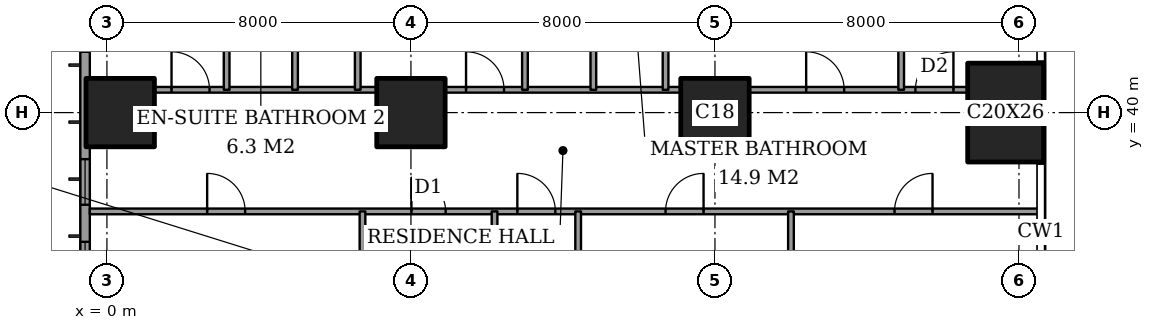
"""IFC4 building model, lengths in metres.
Left out: names, types, materials, properties, quantities, classifications, styles, units other than length and angle.
Written with IfcOpenShell. Run it as: python <this file> out.ifc"""

import sys

from ifc_helpers import new_model, si_unit, direction, frame, frame_2d, origin, origin_2d, place, context, subcontext, project, spatial, rectangle, extrude, element, fill, save


model = new_model("IFC4")
c1 = context("Model", 3, precision=1e-05, world=origin(), true_north=direction((0.0, 1.0)))
c2 = subcontext(c1, "Body", "Model", "MODEL_VIEW")
j1 = project(units=[si_unit("LENGTHUNIT", "METRE"), si_unit("PLANEANGLEUNIT", "RADIAN")], contexts=[c1])
p1 = place(None, origin())
s1 = spatial("IfcSite", under=j1, at=p1, CompositionType="ELEMENT")
p2 = place(p1, origin())
s2 = spatial("IfcBuilding", under=s1, at=p2, CompositionType="ELEMENT")
p3 = place(p2, frame((0.0, 0.0, 193.0)))
s3 = spatial("IfcBuildingStorey", under=s2, at=p3, CompositionType="ELEMENT", Elevation=193.0)
for number, where, z_axis, x_axis in (
    (1, (0.35, 40.0, 0.0), (0.0, 0.0, 1.0), (1.0, 0.0, 0.0)),
    (2, (8.0, 40.0, 0.0), (0.0, 0.0, 1.0), (1.0, 0.0, 0.0)),
    (3, (16.0, 40.0, 0.0), (0.0, 0.0, 1.0), (1.0, 0.0, 0.0)),
):
    element("IfcColumn", number, at=place(p3, frame(where, z_axis=z_axis, x_axis=x_axis)), inside=s3, PredefinedType="COLUMN", context=c2, shape_type="SweptSolid", body=[
        extrude(rectangle(XDim=1.8, YDim=1.8, at=origin_2d()), origin(), (0.0, 0.0, 1.0), 3.6),
    ])
p4 = place(p3, frame((23.65, 40.0, 0.0), z_axis=(0.0, 0.0, 1.0), x_axis=(1.0, 0.0, 0.0)))
e4 = element("IfcColumn", 4, at=p4, inside=s3, PredefinedType="COLUMN", context=c2, shape_type="SweptSolid", body=[
    extrude(rectangle(XDim=2.0, YDim=2.6, at=origin_2d()), origin(), (0.0, 0.0, 1.0), 3.6),
])
p5 = place(p3, frame((-0.575, 44.825, 0.0), z_axis=(0.0, 0.0, 1.0), x_axis=(0.0, -1.0, 0.0)))
e5 = element("IfcWall", 5, at=p5, inside=s3, PredefinedType="SOLIDWALL", context=c2, shape_type="SweptSolid", body=[
    extrude(rectangle(XDim=41.65, YDim=0.25, at=frame_2d((20.825, 0.0))), origin(), (0.0, 0.0, 1.0), 3.6),
])
p6 = place(p5, frame((0.825, 0.0, 0.2)))
e6 = element("IfcOpeningElement", 6, at=p6, cuts=e5, PredefinedType="OPENING", context=c2, shape_type="SweptSolid", body=[
    extrude(rectangle(XDim=2.4, YDim=2.4, at=frame_2d((1.2, 1.2))), frame((0.0, 0.135, 0.0), z_axis=(0.0, -1.0, 0.0), x_axis=(1.0, 0.0, 0.0)), (0.0, 0.0, 1.0), 0.27),
])
p7 = place(p5, frame((6.05, 0.0, 0.2)))
e7 = element("IfcOpeningElement", 7, at=p7, cuts=e5, PredefinedType="OPENING", context=c2, shape_type="SweptSolid", body=[
    extrude(rectangle(XDim=1.2, YDim=2.4, at=frame_2d((0.6, 1.2))), frame((0.0, 0.135, 0.0), z_axis=(0.0, -1.0, 0.0), x_axis=(1.0, 0.0, 0.0)), (0.0, 0.0, 1.0), 0.27),
])
p8 = place(p5, frame((8.225, 0.0, 0.2)))
e8 = element("IfcOpeningElement", 8, at=p8, cuts=e5, PredefinedType="OPENING", context=c2, shape_type="SweptSolid", body=[
    extrude(rectangle(XDim=2.4, YDim=2.4, at=frame_2d((1.2, 1.2))), frame((0.0, 0.135, 0.0), z_axis=(0.0, -1.0, 0.0), x_axis=(1.0, 0.0, 0.0)), (0.0, 0.0, 1.0), 0.27),
])
p9 = place(p5, frame((15.625, 0.0, 0.2)))
e9 = element("IfcOpeningElement", 9, at=p9, cuts=e5, PredefinedType="OPENING", context=c2, shape_type="SweptSolid", body=[
    extrude(rectangle(XDim=2.4, YDim=2.4, at=frame_2d((1.2, 1.2))), frame((0.0, 0.135, 0.0), z_axis=(0.0, -1.0, 0.0), x_axis=(1.0, 0.0, 0.0)), (0.0, 0.0, 1.0), 0.27),
])
p10 = place(p5, frame((23.625, 0.0, 0.2)))
e10 = element("IfcOpeningElement", 10, at=p10, cuts=e5, PredefinedType="OPENING", context=c2, shape_type="SweptSolid", body=[
    extrude(rectangle(XDim=2.4, YDim=2.4, at=frame_2d((1.2, 1.2))), frame((0.0, 0.135, 0.0), z_axis=(0.0, -1.0, 0.0), x_axis=(1.0, 0.0, 0.0)), (0.0, 0.0, 1.0), 0.27),
])
p11 = place(p5, frame((30.775, 0.0, 0.2)))
e11 = element("IfcOpeningElement", 11, at=p11, cuts=e5, PredefinedType="OPENING", context=c2, shape_type="SweptSolid", body=[
    extrude(rectangle(XDim=2.4, YDim=2.4, at=frame_2d((1.2, 1.2))), frame((0.0, 0.135, 0.0), z_axis=(0.0, -1.0, 0.0), x_axis=(1.0, 0.0, 0.0)), (0.0, 0.0, 1.0), 0.27),
])
p12 = place(p5, frame((34.55, 0.0, 0.2)))
e12 = element("IfcOpeningElement", 12, at=p12, cuts=e5, PredefinedType="OPENING", context=c2, shape_type="SweptSolid", body=[
    extrude(rectangle(XDim=1.2, YDim=2.4, at=frame_2d((0.6, 1.2))), frame((0.0, 0.135, 0.0), z_axis=(0.0, -1.0, 0.0), x_axis=(1.0, 0.0, 0.0)), (0.0, 0.0, 1.0), 0.27),
])
p13 = place(p5, frame((38.425, 0.0, 0.2)))
e13 = element("IfcOpeningElement", 13, at=p13, cuts=e5, PredefinedType="OPENING", context=c2, shape_type="SweptSolid", body=[
    extrude(rectangle(XDim=2.4, YDim=2.4, at=frame_2d((1.2, 1.2))), frame((0.0, 0.135, 0.0), z_axis=(0.0, -1.0, 0.0), x_axis=(1.0, 0.0, 0.0)), (0.0, 0.0, 1.0), 0.27),
])
p14 = place(p3, frame((-0.45, 37.4, 0.0), z_axis=(0.0, 0.0, 1.0), x_axis=(1.0, 0.0, 0.0)))
e14 = element("IfcWall", 14, at=p14, inside=s3, PredefinedType="PARTITIONING", context=c2, shape_type="SweptSolid", body=[
    extrude(rectangle(XDim=25.011, YDim=0.15, at=frame_2d((12.505, 0.0))), origin(), (0.0, 0.0, 1.0), 3.35),
])
p15 = place(p14, frame((11.25, 0.0, 0.0)))
e15 = element("IfcOpeningElement", 15, at=p15, cuts=e14, PredefinedType="OPENING", context=c2, shape_type="SweptSolid", body=[
    extrude(rectangle(XDim=1.0, YDim=2.1, at=frame_2d((0.5, 1.05))), frame((0.0, 0.085, 0.0), z_axis=(0.0, -1.0, 0.0), x_axis=(1.0, 0.0, 0.0)), (0.0, 0.0, 1.0), 0.17),
])
p16 = place(p14, frame((3.087, 0.0, 0.0)))
e16 = element("IfcOpeningElement", 16, at=p16, cuts=e14, PredefinedType="OPENING", context=c2, shape_type="SweptSolid", body=[
    extrude(rectangle(XDim=1.0, YDim=2.1, at=frame_2d((0.5, 1.05))), frame((0.0, 0.085, 0.0), z_axis=(0.0, -1.0, 0.0), x_axis=(1.0, 0.0, 0.0)), (0.0, 0.0, 1.0), 0.17),
])
p17 = place(p14, frame((8.462, 0.0, 0.0)))
e17 = element("IfcOpeningElement", 17, at=p17, cuts=e14, PredefinedType="OPENING", context=c2, shape_type="SweptSolid", body=[
    extrude(rectangle(XDim=0.9, YDim=2.1, at=frame_2d((0.45, 1.05))), frame((0.0, 0.085, 0.0), z_axis=(0.0, -1.0, 0.0), x_axis=(1.0, 0.0, 0.0)), (0.0, 0.0, 1.0), 0.17),
])
p18 = place(p14, frame((15.15, 0.0, 0.0)))
e18 = element("IfcOpeningElement", 18, at=p18, cuts=e14, PredefinedType="OPENING", context=c2, shape_type="SweptSolid", body=[
    extrude(rectangle(XDim=1.0, YDim=2.1, at=frame_2d((0.5, 1.05))), frame((0.0, 0.085, 0.0), z_axis=(0.0, -1.0, 0.0), x_axis=(1.0, 0.0, 0.0)), (0.0, 0.0, 1.0), 0.17),
])
p19 = place(p14, frame((21.175, 0.0, 0.0)))
e19 = element("IfcOpeningElement", 19, at=p19, cuts=e14, PredefinedType="OPENING", context=c2, shape_type="SweptSolid", body=[
    extrude(rectangle(XDim=1.0, YDim=2.1, at=frame_2d((0.5, 1.05))), frame((0.0, 0.085, 0.0), z_axis=(0.0, -1.0, 0.0), x_axis=(1.0, 0.0, 0.0)), (0.0, 0.0, 1.0), 0.17),
])
p20 = place(p3, frame((1.25, 40.6, 0.0), z_axis=(0.0, 0.0, 1.0), x_axis=(1.0, 0.0, 0.0)))
e20 = element("IfcWall", 20, at=p20, inside=s3, PredefinedType="PARTITIONING", context=c2, shape_type="SweptSolid", body=[
    extrude(rectangle(XDim=5.85, YDim=0.15, at=frame_2d((2.925, 0.0))), origin(), (0.0, 0.0, 1.0), 3.35),
])
p21 = place(p20, frame((0.45, 0.0, 0.0)))
e21 = element("IfcOpeningElement", 21, at=p21, cuts=e20, PredefinedType="OPENING", context=c2, shape_type="SweptSolid", body=[
    extrude(rectangle(XDim=1.0, YDim=2.1, at=frame_2d((0.5, 1.05))), frame((0.0, 0.085, 0.0), z_axis=(0.0, -1.0, 0.0), x_axis=(1.0, 0.0, 0.0)), (0.0, 0.0, 1.0), 0.17),
])
p22 = place(p3, frame((8.9, 40.6, 0.0), z_axis=(0.0, 0.0, 1.0), x_axis=(1.0, 0.0, 0.0)))
e22 = element("IfcWall", 22, at=p22, inside=s3, PredefinedType="PARTITIONING", context=c2, shape_type="SweptSolid", body=[
    extrude(rectangle(XDim=6.2, YDim=0.15, at=frame_2d((3.1, 0.0))), origin(), (0.0, 0.0, 1.0), 3.35),
])
p23 = place(p22, frame((0.55, 0.0, 0.0)))
e23 = element("IfcOpeningElement", 23, at=p23, cuts=e22, PredefinedType="OPENING", context=c2, shape_type="SweptSolid", body=[
    extrude(rectangle(XDim=1.0, YDim=2.1, at=frame_2d((0.5, 1.05))), frame((0.0, 0.085, 0.0), z_axis=(0.0, -1.0, 0.0), x_axis=(1.0, 0.0, 0.0)), (0.0, 0.0, 1.0), 0.17),
])
p24 = place(p3, frame((16.9, 40.6, 0.0), z_axis=(0.0, 0.0, 1.0), x_axis=(1.0, 0.0, 0.0)))
e24 = element("IfcWall", 24, at=p24, inside=s3, PredefinedType="PARTITIONING", context=c2, shape_type="SweptSolid", body=[
    extrude(rectangle(XDim=5.75, YDim=0.15, at=frame_2d((2.875, 0.0))), origin(), (0.0, 0.0, 1.0), 3.35),
])
p25 = place(p24, frame((1.5, 0.0, 0.0)))
e25 = element("IfcOpeningElement", 25, at=p25, cuts=e24, PredefinedType="OPENING", context=c2, shape_type="SweptSolid", body=[
    extrude(rectangle(XDim=1.0, YDim=2.1, at=frame_2d((0.5, 1.05))), frame((0.0, 0.085, 0.0), z_axis=(0.0, -1.0, 0.0), x_axis=(1.0, 0.0, 0.0)), (0.0, 0.0, 1.0), 0.17),
])
p26 = place(p24, frame((4.375, 0.0, 0.0)))
e26 = element("IfcOpeningElement", 26, at=p26, cuts=e24, PredefinedType="OPENING", context=c2, shape_type="SweptSolid", body=[
    extrude(rectangle(XDim=1.0, YDim=2.1, at=frame_2d((0.5, 1.05))), frame((0.0, 0.085, 0.0), z_axis=(0.0, -1.0, 0.0), x_axis=(1.0, 0.0, 0.0)), (0.0, 0.0, 1.0), 0.17),
])
p27 = place(p3, frame((3.15, 40.6, 0.0), z_axis=(0.0, 0.0, 1.0), x_axis=(0.0, 1.0, 0.0)))
e27 = element("IfcWall", 27, at=p27, inside=s3, PredefinedType="PARTITIONING", context=c2, shape_type="SweptSolid", body=[
    extrude(rectangle(XDim=3.5, YDim=0.15, at=frame_2d((1.75, 0.0))), origin(), (0.0, 0.0, 1.0), 3.35),
])
p28 = place(p27, frame((1.3, 0.0, 0.0)))
e28 = element("IfcOpeningElement", 28, at=p28, cuts=e27, PredefinedType="OPENING", context=c2, shape_type="SweptSolid", body=[
    extrude(rectangle(XDim=0.9, YDim=2.1, at=frame_2d((0.45, 1.05))), frame((0.0, 0.085, 0.0), z_axis=(0.0, -1.0, 0.0), x_axis=(1.0, 0.0, 0.0)), (0.0, 0.0, 1.0), 0.17),
])
p29 = place(p3, frame((4.95, 40.6, 0.0), z_axis=(0.0, 0.0, 1.0), x_axis=(0.0, 1.0, 0.0)))
e29 = element("IfcWall", 29, at=p29, inside=s3, PredefinedType="PARTITIONING", context=c2, shape_type="SweptSolid", body=[
    extrude(rectangle(XDim=7.85, YDim=0.15, at=frame_2d((3.925, 0.0))), origin(), (0.0, 0.0, 1.0), 3.35),
])
p30 = place(p29, frame((5.225, 0.0, 0.0)))
e30 = element("IfcOpeningElement", 30, at=p30, cuts=e29, PredefinedType="OPENING", context=c2, shape_type="SweptSolid", body=[
    extrude(rectangle(XDim=0.9, YDim=2.1, at=frame_2d((0.45, 1.05))), frame((0.0, 0.085, 0.0), z_axis=(0.0, -1.0, 0.0), x_axis=(1.0, 0.0, 0.0)), (0.0, 0.0, 1.0), 0.17),
])
p31 = place(p3, frame((6.6, 40.6, 0.0), z_axis=(0.0, 0.0, 1.0), x_axis=(0.0, 1.0, 0.0)))
e31 = element("IfcWall", 31, at=p31, inside=s3, PredefinedType="PARTITIONING", context=c2, shape_type="SweptSolid", body=[
    extrude(rectangle(XDim=7.85, YDim=0.15, at=frame_2d((3.925, 0.0))), origin(), (0.0, 0.0, 1.0), 3.35),
])
p32 = place(p3, frame((6.725, 33.2, 0.0), z_axis=(0.0, 0.0, 1.0), x_axis=(0.0, 1.0, 0.0)))
e32 = element("IfcWall", 32, at=p32, inside=s3, PredefinedType="PARTITIONING", context=c2, shape_type="SweptSolid", body=[
    extrude(rectangle(XDim=4.2, YDim=0.15, at=frame_2d((2.1, 0.0))), origin(), (0.0, 0.0, 1.0), 3.35),
])
p33 = place(p3, frame((10.2, 28.0, 0.0), z_axis=(0.0, 0.0, 1.0), x_axis=(0.0, 1.0, 0.0)))
e33 = element("IfcWall", 33, at=p33, inside=s3, PredefinedType="PARTITIONING", context=c2, shape_type="SweptSolid", body=[
    extrude(rectangle(XDim=9.4, YDim=0.15, at=frame_2d((4.7, 0.0))), origin(), (0.0, 0.0, 1.0), 3.35),
])
p34 = place(p33, frame((0.837, 0.0, 0.0)))
e34 = element("IfcOpeningElement", 34, at=p34, cuts=e33, PredefinedType="OPENING", context=c2, shape_type="SweptSolid", body=[
    extrude(rectangle(XDim=1.0, YDim=2.1, at=frame_2d((0.5, 1.05))), frame((0.0, 0.085, 0.0), z_axis=(0.0, -1.0, 0.0), x_axis=(1.0, 0.0, 0.0)), (0.0, 0.0, 1.0), 0.17),
])
p35 = place(p3, frame((11.0, 40.6, 0.0), z_axis=(0.0, 0.0, 1.0), x_axis=(0.0, 1.0, 0.0)))
e35 = element("IfcWall", 35, at=p35, inside=s3, PredefinedType="PARTITIONING", context=c2, shape_type="SweptSolid", body=[
    extrude(rectangle(XDim=7.85, YDim=0.15, at=frame_2d((3.925, 0.0))), origin(), (0.0, 0.0, 1.0), 3.35),
])
p36 = place(p35, frame((3.475, 0.0, 0.0)))
e36 = element("IfcOpeningElement", 36, at=p36, cuts=e35, PredefinedType="OPENING", context=c2, shape_type="SweptSolid", body=[
    extrude(rectangle(XDim=0.9, YDim=2.1, at=frame_2d((0.45, 1.05))), frame((0.0, 0.085, 0.0), z_axis=(0.0, -1.0, 0.0), x_axis=(1.0, 0.0, 0.0)), (0.0, 0.0, 1.0), 0.17),
])
p37 = place(p3, frame((12.4, 30.675, 0.0), z_axis=(0.0, 0.0, 1.0), x_axis=(0.0, 1.0, 0.0)))
e37 = element("IfcWall", 37, at=p37, inside=s3, PredefinedType="PARTITIONING", context=c2, shape_type="SweptSolid", body=[
    extrude(rectangle(XDim=6.725, YDim=0.15, at=frame_2d((3.362, 0.0))), origin(), (0.0, 0.0, 1.0), 3.35),
])
p38 = place(p3, frame((12.8, 40.6, 0.0), z_axis=(0.0, 0.0, 1.0), x_axis=(0.0, 1.0, 0.0)))
e38 = element("IfcWall", 38, at=p38, inside=s3, PredefinedType="PARTITIONING", context=c2, shape_type="SweptSolid", body=[
    extrude(rectangle(XDim=7.85, YDim=0.15, at=frame_2d((3.925, 0.0))), origin(), (0.0, 0.0, 1.0), 3.35),
])
p39 = place(p3, frame((14.7, 40.6, 0.0), z_axis=(0.0, 0.0, 1.0), x_axis=(0.0, 1.0, 0.0)))
e39 = element("IfcWall", 39, at=p39, inside=s3, PredefinedType="PARTITIONING", context=c2, shape_type="SweptSolid", body=[
    extrude(rectangle(XDim=7.85, YDim=0.15, at=frame_2d((3.925, 0.0))), origin(), (0.0, 0.0, 1.0), 3.35),
])
p40 = place(p39, frame((3.475, 0.0, 0.0)))
e40 = element("IfcOpeningElement", 40, at=p40, cuts=e39, PredefinedType="OPENING", context=c2, shape_type="SweptSolid", body=[
    extrude(rectangle(XDim=0.9, YDim=2.1, at=frame_2d((0.45, 1.05))), frame((0.0, 0.085, 0.0), z_axis=(0.0, -1.0, 0.0), x_axis=(1.0, 0.0, 0.0)), (0.0, 0.0, 1.0), 0.17),
])
p41 = place(p3, frame((18.0, 28.0, 0.0), z_axis=(0.0, 0.0, 1.0), x_axis=(0.0, 1.0, 0.0)))
e41 = element("IfcWall", 41, at=p41, inside=s3, PredefinedType="PARTITIONING", context=c2, shape_type="SweptSolid", body=[
    extrude(rectangle(XDim=9.4, YDim=0.15, at=frame_2d((4.7, 0.0))), origin(), (0.0, 0.0, 1.0), 3.35),
])
p42 = place(p41, frame((0.837, 0.0, 0.0)))
e42 = element("IfcOpeningElement", 42, at=p42, cuts=e41, PredefinedType="OPENING", context=c2, shape_type="SweptSolid", body=[
    extrude(rectangle(XDim=1.0, YDim=2.1, at=frame_2d((0.5, 1.05))), frame((0.0, 0.085, 0.0), z_axis=(0.0, -1.0, 0.0), x_axis=(1.0, 0.0, 0.0)), (0.0, 0.0, 1.0), 0.17),
])
p43 = place(p3, frame((20.9, 40.6, 0.0), z_axis=(0.0, 0.0, 1.0), x_axis=(0.0, 1.0, 0.0)))
e43 = element("IfcWall", 43, at=p43, inside=s3, PredefinedType="PARTITIONING", context=c2, shape_type="SweptSolid", body=[
    extrude(rectangle(XDim=7.85, YDim=0.15, at=frame_2d((3.925, 0.0))), origin(), (0.0, 0.0, 1.0), 3.35),
])
p44 = place(p7, origin())
e44 = element("IfcWindow", 44, at=p44, inside=s3, PartitioningType="SINGLE_PANEL", PredefinedType="WINDOW", context=c2, shape_type="SweptSolid", body=[
    extrude(rectangle(XDim=1.2, YDim=2.4, at=frame_2d((0.6, 1.2))), frame((0.0, 0.03, 0.0), z_axis=(0.0, -1.0, 0.0), x_axis=(1.0, 0.0, 0.0)), (0.0, 0.0, 1.0), 0.06),
])
fill(e7, e44)
p45 = place(p8, origin())
e45 = element("IfcWindow", 45, at=p45, inside=s3, PartitioningType="SINGLE_PANEL", PredefinedType="WINDOW", context=c2, shape_type="SweptSolid", body=[
    extrude(rectangle(XDim=2.4, YDim=2.4, at=frame_2d((1.2, 1.2))), frame((0.0, 0.03, 0.0), z_axis=(0.0, -1.0, 0.0), x_axis=(1.0, 0.0, 0.0)), (0.0, 0.0, 1.0), 0.06),
])
fill(e8, e45)
p46 = place(p21, origin())
e46 = element("IfcDoor", 46, at=p46, inside=s3, OperationType="SINGLE_SWING_RIGHT", PredefinedType="DOOR", context=c2, shape_type="SweptSolid", body=[
    extrude(rectangle(XDim=1.0, YDim=2.1, at=frame_2d((0.5, 1.05))), frame((0.0, 0.025, 0.0), z_axis=(0.0, -1.0, 0.0), x_axis=(1.0, 0.0, 0.0)), (0.0, 0.0, 1.0), 0.05),
])
fill(e21, e46)
p47 = place(p23, origin())
e47 = element("IfcDoor", 47, at=p47, inside=s3, OperationType="SINGLE_SWING_RIGHT", PredefinedType="DOOR", context=c2, shape_type="SweptSolid", body=[
    extrude(rectangle(XDim=1.0, YDim=2.1, at=frame_2d((0.5, 1.05))), frame((0.0, 0.025, 0.0), z_axis=(0.0, -1.0, 0.0), x_axis=(1.0, 0.0, 0.0)), (0.0, 0.0, 1.0), 0.05),
])
fill(e23, e47)
p48 = place(p25, origin())
e48 = element("IfcDoor", 48, at=p48, inside=s3, OperationType="SINGLE_SWING_RIGHT", PredefinedType="DOOR", context=c2, shape_type="SweptSolid", body=[
    extrude(rectangle(XDim=1.0, YDim=2.1, at=frame_2d((0.5, 1.05))), frame((0.0, 0.025, 0.0), z_axis=(0.0, -1.0, 0.0), x_axis=(1.0, 0.0, 0.0)), (0.0, 0.0, 1.0), 0.05),
])
fill(e25, e48)
p49 = place(p26, origin())
e49 = element("IfcDoor", 49, at=p49, inside=s3, OperationType="SINGLE_SWING_LEFT", PredefinedType="DOOR", context=c2, shape_type="SweptSolid", body=[
    extrude(rectangle(XDim=1.0, YDim=2.1, at=frame_2d((0.5, 1.05))), frame((0.0, 0.025, 0.0), z_axis=(0.0, -1.0, 0.0), x_axis=(1.0, 0.0, 0.0)), (0.0, 0.0, 1.0), 0.05),
])
fill(e26, e49)
p50 = place(p15, origin())
e50 = element("IfcDoor", 50, at=p50, inside=s3, OperationType="SINGLE_SWING_RIGHT", PredefinedType="DOOR", context=c2, shape_type="SweptSolid", body=[
    extrude(rectangle(XDim=1.0, YDim=2.1, at=frame_2d((0.5, 1.05))), frame((0.0, 0.025, 0.0), z_axis=(0.0, -1.0, 0.0), x_axis=(1.0, 0.0, 0.0)), (0.0, 0.0, 1.0), 0.05),
])
fill(e15, e50)
p51 = place(p16, origin())
e51 = element("IfcDoor", 51, at=p51, inside=s3, OperationType="SINGLE_SWING_RIGHT", PredefinedType="DOOR", context=c2, shape_type="SweptSolid", body=[
    extrude(rectangle(XDim=1.0, YDim=2.1, at=frame_2d((0.5, 1.05))), frame((0.0, 0.025, 0.0), z_axis=(0.0, -1.0, 0.0), x_axis=(1.0, 0.0, 0.0)), (0.0, 0.0, 1.0), 0.05),
])
fill(e16, e51)
p52 = place(p17, origin())
e52 = element("IfcDoor", 52, at=p52, inside=s3, OperationType="SINGLE_SWING_RIGHT", PredefinedType="DOOR", context=c2, shape_type="SweptSolid", body=[
    extrude(rectangle(XDim=0.9, YDim=2.1, at=frame_2d((0.45, 1.05))), frame((0.0, 0.025, 0.0), z_axis=(0.0, -1.0, 0.0), x_axis=(1.0, 0.0, 0.0)), (0.0, 0.0, 1.0), 0.05),
])
fill(e17, e52)
p53 = place(p18, origin())
e53 = element("IfcDoor", 53, at=p53, inside=s3, OperationType="SINGLE_SWING_LEFT", PredefinedType="DOOR", context=c2, shape_type="SweptSolid", body=[
    extrude(rectangle(XDim=1.0, YDim=2.1, at=frame_2d((0.5, 1.05))), frame((0.0, 0.025, 0.0), z_axis=(0.0, -1.0, 0.0), x_axis=(1.0, 0.0, 0.0)), (0.0, 0.0, 1.0), 0.05),
])
fill(e18, e53)
p54 = place(p19, origin())
e54 = element("IfcDoor", 54, at=p54, inside=s3, OperationType="SINGLE_SWING_LEFT", PredefinedType="DOOR", context=c2, shape_type="SweptSolid", body=[
    extrude(rectangle(XDim=1.0, YDim=2.1, at=frame_2d((0.5, 1.05))), frame((0.0, 0.025, 0.0), z_axis=(0.0, -1.0, 0.0), x_axis=(1.0, 0.0, 0.0)), (0.0, 0.0, 1.0), 0.05),
])
fill(e19, e54)
save(model, sys.argv[1])
